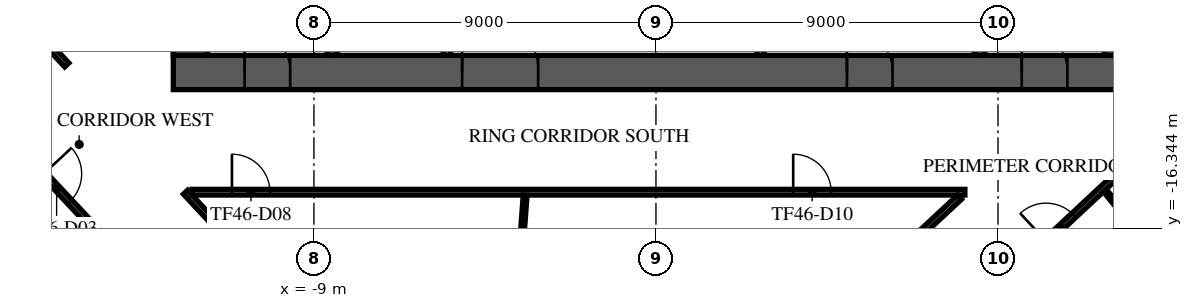
"""IFC4 building model, lengths in metres.
Left out: names, types, materials, properties, quantities, classifications, styles, units other than length and angle.
Written with IfcOpenShell. Run it as: python <this file> out.ifc"""

import sys

from ifc_helpers import new_model, si_unit, direction, frame, frame_2d, origin, place, context, subcontext, project, spatial, rectangle, extrude, element, fill, save


model = new_model("IFC4")
c1 = context("Model", 3, precision=1e-05, world=origin(), true_north=direction((0.0, 1.0)))
c2 = subcontext(c1, "Body", "Model", "MODEL_VIEW")
j1 = project(units=[si_unit("LENGTHUNIT", "METRE"), si_unit("PLANEANGLEUNIT", "RADIAN")], contexts=[c1])
p1 = place(None, origin())
s1 = spatial("IfcSite", under=j1, at=p1, CompositionType="ELEMENT")
p2 = place(p1, origin())
s2 = spatial("IfcBuilding", under=s1, at=p2, CompositionType="ELEMENT")
p3 = place(p2, frame((0.0, 0.0, 197.3)))
s3 = spatial("IfcBuildingStorey", under=s2, at=p3, CompositionType="ELEMENT", Elevation=197.3)
p4 = place(p3, frame((-12.7, -12.25, 0.0), z_axis=(0.0, 0.0, 1.0), x_axis=(1.0, 0.0, 0.0)))
e1 = element("IfcWall", 1, at=p4, inside=s3, PredefinedType="SHEAR", context=c2, shape_type="SweptSolid", body=[
    extrude(rectangle(XDim=25.4, YDim=0.9, at=frame_2d((12.7, 0.0))), origin(), (0.0, 0.0, 1.0), 3.62),
])
p5 = place(p4, frame((7.6, 0.0, 0.0)))
e2 = element("IfcOpeningElement", 2, at=p5, cuts=e1, PredefinedType="OPENING", context=c2, shape_type="SweptSolid", body=[
    extrude(rectangle(XDim=2.0, YDim=2.1, at=frame_2d((1.0, 1.05))), frame((0.0, 0.46, 0.0), z_axis=(0.0, -1.0, 0.0), x_axis=(1.0, 0.0, 0.0)), (0.0, 0.0, 1.0), 0.92),
])
p6 = place(p4, frame((17.725, 0.0, 0.0)))
e3 = element("IfcOpeningElement", 3, at=p6, cuts=e1, PredefinedType="OPENING", context=c2, shape_type="SweptSolid", body=[
    extrude(rectangle(XDim=1.2, YDim=2.1, at=frame_2d((0.6, 1.05))), frame((0.0, 0.46, 0.0), z_axis=(0.0, -1.0, 0.0), x_axis=(1.0, 0.0, 0.0)), (0.0, 0.0, 1.0), 0.92),
])
p7 = place(p4, frame((1.875, 0.0, 0.0)))
e4 = element("IfcOpeningElement", 4, at=p7, cuts=e1, PredefinedType="OPENING", context=c2, shape_type="SweptSolid", body=[
    extrude(rectangle(XDim=1.2, YDim=2.1, at=frame_2d((0.6, 1.05))), frame((0.0, 0.46, 0.0), z_axis=(0.0, -1.0, 0.0), x_axis=(1.0, 0.0, 0.0)), (0.0, 0.0, 1.0), 0.92),
])
p8 = place(p4, frame((22.325, 0.0, 0.0)))
e5 = element("IfcOpeningElement", 5, at=p8, cuts=e1, PredefinedType="OPENING", context=c2, shape_type="SweptSolid", body=[
    extrude(rectangle(XDim=1.2, YDim=2.1, at=frame_2d((0.6, 1.05))), frame((0.0, 0.46, 0.0), z_axis=(0.0, -1.0, 0.0), x_axis=(1.0, 0.0, 0.0)), (0.0, 0.0, 1.0), 0.92),
])
p9 = place(p3, frame((12.25, -11.8, 0.0), z_axis=(0.0, 0.0, 1.0), x_axis=(0.0, 1.0, 0.0)))
e6 = element("IfcWall", 6, at=p9, inside=s3, PredefinedType="SHEAR", context=c2, shape_type="SweptSolid", body=[
    extrude(rectangle(XDim=23.6, YDim=0.9, at=frame_2d((11.8, 0.0))), origin(), (0.0, 0.0, 1.0), 3.62),
])
p10 = place(p9, frame((10.6, 0.0, 0.0)))
e7 = element("IfcOpeningElement", 7, at=p10, cuts=e6, PredefinedType="OPENING", context=c2, shape_type="SweptSolid", body=[
    extrude(rectangle(XDim=2.4, YDim=2.4, at=frame_2d((1.2, 1.2))), frame((0.0, 0.46, 0.0), z_axis=(0.0, -1.0, 0.0), x_axis=(1.0, 0.0, 0.0)), (0.0, 0.0, 1.0), 0.92),
])
p11 = place(p3, frame((-12.25, -11.8, 0.0), z_axis=(0.0, 0.0, 1.0), x_axis=(0.0, 1.0, 0.0)))
e8 = element("IfcWall", 8, at=p11, inside=s3, PredefinedType="SHEAR", context=c2, shape_type="SweptSolid", body=[
    extrude(rectangle(XDim=23.6, YDim=0.9, at=frame_2d((11.8, 0.0))), origin(), (0.0, 0.0, 1.0), 3.62),
])
p12 = place(p11, frame((10.6, 0.0, 0.0)))
e9 = element("IfcOpeningElement", 9, at=p12, cuts=e8, PredefinedType="OPENING", context=c2, shape_type="SweptSolid", body=[
    extrude(rectangle(XDim=2.4, YDim=2.4, at=frame_2d((1.2, 1.2))), frame((0.0, 0.46, 0.0), z_axis=(0.0, -1.0, 0.0), x_axis=(1.0, 0.0, 0.0)), (0.0, 0.0, 1.0), 0.92),
])
p13 = place(p3, frame((-8.512, -4.55, 0.0), z_axis=(0.0, 0.0, 1.0), x_axis=(0.0, -1.0, 0.0)))
e10 = element("IfcWall", 10, at=p13, inside=s3, PredefinedType="SOLIDWALL", context=c2, shape_type="SweptSolid", body=[
    extrude(rectangle(XDim=7.25, YDim=0.275, at=frame_2d((3.625, 0.0))), origin(), (0.0, 0.0, 1.0), 3.62),
])
p14 = place(p13, frame((6.0, 0.0, 0.0)))
e11 = element("IfcOpeningElement", 11, at=p14, cuts=e10, PredefinedType="OPENING", context=c2, shape_type="SweptSolid", body=[
    extrude(rectangle(XDim=1.0, YDim=2.1, at=frame_2d((0.5, 1.05))), frame((0.0, 0.147, 0.0), z_axis=(0.0, -1.0, 0.0), x_axis=(1.0, 0.0, 0.0)), (0.0, 0.0, 1.0), 0.295),
])
p15 = place(p3, frame((8.512, -4.55, 0.0), z_axis=(0.0, 0.0, 1.0), x_axis=(0.0, -1.0, 0.0)))
e12 = element("IfcWall", 12, at=p15, inside=s3, PredefinedType="SOLIDWALL", context=c2, shape_type="SweptSolid", body=[
    extrude(rectangle(XDim=7.25, YDim=0.275, at=frame_2d((3.625, 0.0))), origin(), (0.0, 0.0, 1.0), 3.62),
])
p16 = place(p15, frame((6.0, 0.0, 0.0)))
e13 = element("IfcOpeningElement", 13, at=p16, cuts=e12, PredefinedType="OPENING", context=c2, shape_type="SweptSolid", body=[
    extrude(rectangle(XDim=1.0, YDim=2.1, at=frame_2d((0.5, 1.05))), frame((0.0, 0.147, 0.0), z_axis=(0.0, -1.0, 0.0), x_axis=(1.0, 0.0, 0.0)), (0.0, 0.0, 1.0), 0.295),
])
p17 = place(p3, frame((-5.5, -11.795, 0.0), z_axis=(0.0, 0.0, 1.0), x_axis=(0.0, 1.0, 0.0)))
e14 = element("IfcWall", 14, at=p17, inside=s3, PredefinedType="PARTITIONING", context=c2, shape_type="SweptSolid", body=[
    extrude(rectangle(XDim=2.99, YDim=0.2, at=frame_2d((1.495, 0.0))), origin(), (0.0, 0.0, 1.0), 3.62),
])
p18 = place(p17, frame((0.657, 0.0, 0.0)))
e15 = element("IfcOpeningElement", 15, at=p18, cuts=e14, PredefinedType="OPENING", context=c2, shape_type="SweptSolid", body=[
    extrude(rectangle(XDim=1.8, YDim=2.1, at=frame_2d((0.9, 1.05))), frame((0.0, 0.11, 0.0), z_axis=(0.0, -1.0, 0.0), x_axis=(1.0, 0.0, 0.0)), (0.0, 0.0, 1.0), 0.22),
])
p19 = place(p3, frame((2.75, -11.795, 0.0), z_axis=(0.0, 0.0, 1.0), x_axis=(0.0, 1.0, 0.0)))
e16 = element("IfcWall", 16, at=p19, inside=s3, PredefinedType="PARTITIONING", context=c2, shape_type="SweptSolid", body=[
    extrude(rectangle(XDim=2.99, YDim=0.2, at=frame_2d((1.495, 0.0))), origin(), (0.0, 0.0, 1.0), 3.62),
])
p20 = place(p3, frame((-35.02, -5.994, 0.0), z_axis=(0.0, 0.0, 1.0), x_axis=(0.682002361324, -0.731349970362, 0.0)))
e17 = element("IfcWall", 17, at=p20, inside=s3, PredefinedType="STANDARD", context=c2, shape_type="SweptSolid", body=[
    extrude(rectangle(XDim=39.0, YDim=0.6, at=frame_2d((19.5, 0.0))), origin(), (0.0, 0.0, 1.0), 3.62),
])
p21 = place(p20, frame((1.217, 0.0, 0.9)))
e18 = element("IfcOpeningElement", 18, at=p21, cuts=e17, PredefinedType="OPENING", context=c2, shape_type="SweptSolid", body=[
    extrude(rectangle(XDim=1.9, YDim=2.1, at=frame_2d((0.95, 1.05))), frame((0.0, 0.31, 0.0), z_axis=(0.0, -1.0, 0.0), x_axis=(1.0, 0.0, 0.0)), (0.0, 0.0, 1.0), 0.62),
])
p22 = place(p20, frame((5.55, 0.0, 0.9)))
e19 = element("IfcOpeningElement", 19, at=p22, cuts=e17, PredefinedType="OPENING", context=c2, shape_type="SweptSolid", body=[
    extrude(rectangle(XDim=1.9, YDim=2.1, at=frame_2d((0.95, 1.05))), frame((0.0, 0.31, 0.0), z_axis=(0.0, -1.0, 0.0), x_axis=(1.0, 0.0, 0.0)), (0.0, 0.0, 1.0), 0.62),
])
p23 = place(p20, frame((9.883, 0.0, 0.9)))
e20 = element("IfcOpeningElement", 20, at=p23, cuts=e17, PredefinedType="OPENING", context=c2, shape_type="SweptSolid", body=[
    extrude(rectangle(XDim=1.9, YDim=2.1, at=frame_2d((0.95, 1.05))), frame((0.0, 0.31, 0.0), z_axis=(0.0, -1.0, 0.0), x_axis=(1.0, 0.0, 0.0)), (0.0, 0.0, 1.0), 0.62),
])
p24 = place(p20, frame((14.217, 0.0, 0.9)))
e21 = element("IfcOpeningElement", 21, at=p24, cuts=e17, PredefinedType="OPENING", context=c2, shape_type="SweptSolid", body=[
    extrude(rectangle(XDim=1.9, YDim=2.1, at=frame_2d((0.95, 1.05))), frame((0.0, 0.31, 0.0), z_axis=(0.0, -1.0, 0.0), x_axis=(1.0, 0.0, 0.0)), (0.0, 0.0, 1.0), 0.62),
])
p25 = place(p20, frame((18.55, 0.0, 0.9)))
e22 = element("IfcOpeningElement", 22, at=p25, cuts=e17, PredefinedType="OPENING", context=c2, shape_type="SweptSolid", body=[
    extrude(rectangle(XDim=1.9, YDim=2.1, at=frame_2d((0.95, 1.05))), frame((0.0, 0.31, 0.0), z_axis=(0.0, -1.0, 0.0), x_axis=(1.0, 0.0, 0.0)), (0.0, 0.0, 1.0), 0.62),
])
p26 = place(p20, frame((22.883, 0.0, 0.9)))
e23 = element("IfcOpeningElement", 23, at=p26, cuts=e17, PredefinedType="OPENING", context=c2, shape_type="SweptSolid", body=[
    extrude(rectangle(XDim=1.9, YDim=2.1, at=frame_2d((0.95, 1.05))), frame((0.0, 0.31, 0.0), z_axis=(0.0, -1.0, 0.0), x_axis=(1.0, 0.0, 0.0)), (0.0, 0.0, 1.0), 0.62),
])
p27 = place(p20, frame((27.217, 0.0, 0.9)))
e24 = element("IfcOpeningElement", 24, at=p27, cuts=e17, PredefinedType="OPENING", context=c2, shape_type="SweptSolid", body=[
    extrude(rectangle(XDim=1.9, YDim=2.1, at=frame_2d((0.95, 1.05))), frame((0.0, 0.31, 0.0), z_axis=(0.0, -1.0, 0.0), x_axis=(1.0, 0.0, 0.0)), (0.0, 0.0, 1.0), 0.62),
])
p28 = place(p20, frame((31.55, 0.0, 0.9)))
e25 = element("IfcOpeningElement", 25, at=p28, cuts=e17, PredefinedType="OPENING", context=c2, shape_type="SweptSolid", body=[
    extrude(rectangle(XDim=1.9, YDim=2.1, at=frame_2d((0.95, 1.05))), frame((0.0, 0.31, 0.0), z_axis=(0.0, -1.0, 0.0), x_axis=(1.0, 0.0, 0.0)), (0.0, 0.0, 1.0), 0.62),
])
p29 = place(p20, frame((35.883, 0.0, 0.9)))
e26 = element("IfcOpeningElement", 26, at=p29, cuts=e17, PredefinedType="OPENING", context=c2, shape_type="SweptSolid", body=[
    extrude(rectangle(XDim=1.9, YDim=2.1, at=frame_2d((0.95, 1.05))), frame((0.0, 0.31, 0.0), z_axis=(0.0, -1.0, 0.0), x_axis=(1.0, 0.0, 0.0)), (0.0, 0.0, 1.0), 0.62),
])
p30 = place(p3, frame((-1.073, -34.773, 0.0), z_axis=(0.0, 0.0, 1.0), x_axis=(0.731351780381, 0.682000420333, 0.0)))
e27 = element("IfcWall", 27, at=p30, inside=s3, PredefinedType="STANDARD", context=c2, shape_type="SweptSolid", body=[
    extrude(rectangle(XDim=49.0, YDim=0.6, at=frame_2d((24.5, 0.0))), origin(), (0.0, 0.0, 1.0), 3.62),
])
p31 = place(p30, frame((1.227, 0.0, 0.9)))
e28 = element("IfcOpeningElement", 28, at=p31, cuts=e27, PredefinedType="OPENING", context=c2, shape_type="SweptSolid", body=[
    extrude(rectangle(XDim=2.0, YDim=2.1, at=frame_2d((1.0, 1.05))), frame((0.0, 0.31, 0.0), z_axis=(0.0, -1.0, 0.0), x_axis=(1.0, 0.0, 0.0)), (0.0, 0.0, 1.0), 0.62),
])
p32 = place(p30, frame((5.682, 0.0, 0.9)))
e29 = element("IfcOpeningElement", 29, at=p32, cuts=e27, PredefinedType="OPENING", context=c2, shape_type="SweptSolid", body=[
    extrude(rectangle(XDim=2.0, YDim=2.1, at=frame_2d((1.0, 1.05))), frame((0.0, 0.31, 0.0), z_axis=(0.0, -1.0, 0.0), x_axis=(1.0, 0.0, 0.0)), (0.0, 0.0, 1.0), 0.62),
])
p33 = place(p30, frame((14.591, 0.0, 0.9)))
e30 = element("IfcOpeningElement", 30, at=p33, cuts=e27, PredefinedType="OPENING", context=c2, shape_type="SweptSolid", body=[
    extrude(rectangle(XDim=2.0, YDim=2.1, at=frame_2d((1.0, 1.05))), frame((0.0, 0.31, 0.0), z_axis=(0.0, -1.0, 0.0), x_axis=(1.0, 0.0, 0.0)), (0.0, 0.0, 1.0), 0.62),
])
p34 = place(p30, frame((19.045, 0.0, 0.9)))
e31 = element("IfcOpeningElement", 31, at=p34, cuts=e27, PredefinedType="OPENING", context=c2, shape_type="SweptSolid", body=[
    extrude(rectangle(XDim=2.0, YDim=2.1, at=frame_2d((1.0, 1.05))), frame((0.0, 0.31, 0.0), z_axis=(0.0, -1.0, 0.0), x_axis=(1.0, 0.0, 0.0)), (0.0, 0.0, 1.0), 0.62),
])
p35 = place(p30, frame((23.5, 0.0, 0.9)))
e32 = element("IfcOpeningElement", 32, at=p35, cuts=e27, PredefinedType="OPENING", context=c2, shape_type="SweptSolid", body=[
    extrude(rectangle(XDim=2.0, YDim=2.1, at=frame_2d((1.0, 1.05))), frame((0.0, 0.31, 0.0), z_axis=(0.0, -1.0, 0.0), x_axis=(1.0, 0.0, 0.0)), (0.0, 0.0, 1.0), 0.62),
])
p36 = place(p30, frame((27.955, 0.0, 0.9)))
e33 = element("IfcOpeningElement", 33, at=p36, cuts=e27, PredefinedType="OPENING", context=c2, shape_type="SweptSolid", body=[
    extrude(rectangle(XDim=2.0, YDim=2.1, at=frame_2d((1.0, 1.05))), frame((0.0, 0.31, 0.0), z_axis=(0.0, -1.0, 0.0), x_axis=(1.0, 0.0, 0.0)), (0.0, 0.0, 1.0), 0.62),
])
p37 = place(p30, frame((32.409, 0.0, 0.9)))
e34 = element("IfcOpeningElement", 34, at=p37, cuts=e27, PredefinedType="OPENING", context=c2, shape_type="SweptSolid", body=[
    extrude(rectangle(XDim=2.0, YDim=2.1, at=frame_2d((1.0, 1.05))), frame((0.0, 0.31, 0.0), z_axis=(0.0, -1.0, 0.0), x_axis=(1.0, 0.0, 0.0)), (0.0, 0.0, 1.0), 0.62),
])
p38 = place(p30, frame((36.864, 0.0, 0.9)))
e35 = element("IfcOpeningElement", 35, at=p38, cuts=e27, PredefinedType="OPENING", context=c2, shape_type="SweptSolid", body=[
    extrude(rectangle(XDim=2.0, YDim=2.1, at=frame_2d((1.0, 1.05))), frame((0.0, 0.31, 0.0), z_axis=(0.0, -1.0, 0.0), x_axis=(1.0, 0.0, 0.0)), (0.0, 0.0, 1.0), 0.62),
])
p39 = place(p30, frame((41.318, 0.0, 0.9)))
e36 = element("IfcOpeningElement", 36, at=p39, cuts=e27, PredefinedType="OPENING", context=c2, shape_type="SweptSolid", body=[
    extrude(rectangle(XDim=2.0, YDim=2.1, at=frame_2d((1.0, 1.05))), frame((0.0, 0.31, 0.0), z_axis=(0.0, -1.0, 0.0), x_axis=(1.0, 0.0, 0.0)), (0.0, 0.0, 1.0), 0.62),
])
p40 = place(p30, frame((45.773, 0.0, 0.9)))
e37 = element("IfcOpeningElement", 37, at=p40, cuts=e27, PredefinedType="OPENING", context=c2, shape_type="SweptSolid", body=[
    extrude(rectangle(XDim=2.0, YDim=2.1, at=frame_2d((1.0, 1.05))), frame((0.0, 0.31, 0.0), z_axis=(0.0, -1.0, 0.0), x_axis=(1.0, 0.0, 0.0)), (0.0, 0.0, 1.0), 0.62),
])
p41 = place(p3, frame((-23.582, -6.907, 0.0), z_axis=(0.0, 0.0, 1.0), x_axis=(0.68201130552, -0.73134162957, 0.0)))
e38 = element("IfcWall", 38, at=p41, inside=s3, PredefinedType="PARTITIONING", context=c2, shape_type="SweptSolid", body=[
    extrude(rectangle(XDim=22.137, YDim=0.15, at=frame_2d((11.069, 0.0))), origin(), (0.0, 0.0, 1.0), 3.17),
])
p42 = place(p41, frame((10.953, 0.0, 0.0)))
e39 = element("IfcOpeningElement", 39, at=p42, cuts=e38, PredefinedType="OPENING", context=c2, shape_type="SweptSolid", body=[
    extrude(rectangle(XDim=1.0, YDim=2.1, at=frame_2d((0.5, 1.05))), frame((0.0, 0.085, 0.0), z_axis=(0.0, -1.0, 0.0), x_axis=(1.0, 0.0, 0.0)), (0.0, 0.0, 1.0), 0.17),
])
p43 = place(p3, frame((-21.827, -5.27, 0.0), z_axis=(0.0, 0.0, 1.0), x_axis=(0.682018934887, -0.731334514744, 0.0)))
e40 = element("IfcWall", 40, at=p43, inside=s3, PredefinedType="PARTITIONING", context=c2, shape_type="SweptSolid", body=[
    extrude(rectangle(XDim=9.272, YDim=0.15, at=frame_2d((4.636, 0.0))), origin(), (0.0, 0.0, 1.0), 3.17),
])
p44 = place(p3, frame((-12.38, -15.4, 0.0), z_axis=(0.0, 0.0, 1.0), x_axis=(0.681925559665, -0.731421582314, 0.0)))
e41 = element("IfcWall", 41, at=p44, inside=s3, PredefinedType="PARTITIONING", context=c2, shape_type="SweptSolid", body=[
    extrude(rectangle(XDim=8.287, YDim=0.15, at=frame_2d((4.143, 0.0))), origin(), (0.0, 0.0, 1.0), 3.17),
])
p45 = place(p44, frame((5.55, 0.0, 0.0)))
e42 = element("IfcOpeningElement", 42, at=p45, cuts=e41, PredefinedType="OPENING", context=c2, shape_type="SweptSolid", body=[
    extrude(rectangle(XDim=1.8, YDim=2.1, at=frame_2d((0.9, 1.05))), frame((0.0, 0.085, 0.0), z_axis=(0.0, -1.0, 0.0), x_axis=(1.0, 0.0, 0.0)), (0.0, 0.0, 1.0), 0.17),
])
p46 = place(p3, frame((-12.208, -15.4, 0.0), z_axis=(0.0, 0.0, 1.0), x_axis=(1.0, 0.0, 0.0)))
e43 = element("IfcWall", 43, at=p46, inside=s3, PredefinedType="PARTITIONING", context=c2, shape_type="SweptSolid", body=[
    extrude(rectangle(XDim=20.336, YDim=0.15, at=frame_2d((10.168, 0.0))), origin(), (0.0, 0.0, 1.0), 3.17),
])
p47 = place(p46, frame((1.05, 0.0, 0.0)))
e44 = element("IfcOpeningElement", 44, at=p47, cuts=e43, PredefinedType="OPENING", context=c2, shape_type="SweptSolid", body=[
    extrude(rectangle(XDim=1.0, YDim=2.1, at=frame_2d((0.5, 1.05))), frame((0.0, 0.085, 0.0), z_axis=(0.0, -1.0, 0.0), x_axis=(1.0, 0.0, 0.0)), (0.0, 0.0, 1.0), 0.17),
])
p48 = place(p46, frame((15.818, 0.0, 0.0)))
e45 = element("IfcOpeningElement", 45, at=p48, cuts=e43, PredefinedType="OPENING", context=c2, shape_type="SweptSolid", body=[
    extrude(rectangle(XDim=1.0, YDim=2.1, at=frame_2d((0.5, 1.05))), frame((0.0, 0.085, 0.0), z_axis=(0.0, -1.0, 0.0), x_axis=(1.0, 0.0, 0.0)), (0.0, 0.0, 1.0), 0.17),
])
p49 = place(p3, frame((-0.061, -23.038, 0.0), z_axis=(0.0, 0.0, 1.0), x_axis=(0.731316284431, 0.682038482878, 0.0)))
e46 = element("IfcWall", 46, at=p49, inside=s3, PredefinedType="PARTITIONING", context=c2, shape_type="SweptSolid", body=[
    extrude(rectangle(XDim=11.009, YDim=0.15, at=frame_2d((5.504, 0.0))), origin(), (0.0, 0.0, 1.0), 3.17),
])
p50 = place(p3, frame((1.576, -24.793, 0.0), z_axis=(0.0, 0.0, 1.0), x_axis=(0.731351215564, 0.68200102602, 0.0)))
e47 = element("IfcWall", 47, at=p50, inside=s3, PredefinedType="PARTITIONING", context=c2, shape_type="SweptSolid", body=[
    extrude(rectangle(XDim=31.513, YDim=0.15, at=frame_2d((15.757, 0.0))), origin(), (0.0, 0.0, 1.0), 3.17),
])
p51 = place(p50, frame((2.3, 0.0, 0.0)))
e48 = element("IfcOpeningElement", 48, at=p51, cuts=e47, PredefinedType="OPENING", context=c2, shape_type="SweptSolid", body=[
    extrude(rectangle(XDim=1.8, YDim=2.1, at=frame_2d((0.9, 1.05))), frame((0.0, 0.085, 0.0), z_axis=(0.0, -1.0, 0.0), x_axis=(1.0, 0.0, 0.0)), (0.0, 0.0, 1.0), 0.17),
])
p52 = place(p50, frame((11.883, 0.0, 0.0)))
e49 = element("IfcOpeningElement", 49, at=p52, cuts=e47, PredefinedType="OPENING", context=c2, shape_type="SweptSolid", body=[
    extrude(rectangle(XDim=1.0, YDim=2.1, at=frame_2d((0.5, 1.05))), frame((0.0, 0.085, 0.0), z_axis=(0.0, -1.0, 0.0), x_axis=(1.0, 0.0, 0.0)), (0.0, 0.0, 1.0), 0.17),
])
p53 = place(p50, frame((15.726, 0.0, 0.0)))
e50 = element("IfcOpeningElement", 50, at=p53, cuts=e47, PredefinedType="OPENING", context=c2, shape_type="SweptSolid", body=[
    extrude(rectangle(XDim=1.0, YDim=2.1, at=frame_2d((0.5, 1.05))), frame((0.0, 0.085, 0.0), z_axis=(0.0, -1.0, 0.0), x_axis=(1.0, 0.0, 0.0)), (0.0, 0.0, 1.0), 0.17),
])
p54 = place(p3, frame((-4.597, -31.012, 0.0), z_axis=(0.0, 0.0, 1.0), x_axis=(0.074186343443, 0.997244396548, 0.0)))
e51 = element("IfcWall", 51, at=p54, inside=s3, PredefinedType="PARTITIONING", context=c2, shape_type="SweptSolid", body=[
    extrude(rectangle(XDim=15.576, YDim=0.1, at=frame_2d((7.788, 0.0))), origin(), (0.0, 0.0, 1.0), 2.97),
])
p55 = place(p3, frame((11.812, -15.355, 0.0), z_axis=(0.0, 0.0, 1.0), x_axis=(0.629927020313, -0.776654330497, 0.0)))
e52 = element("IfcWall", 52, at=p55, inside=s3, PredefinedType="PARTITIONING", context=c2, shape_type="SweptSolid", body=[
    extrude(rectangle(XDim=5.125, YDim=0.1, at=frame_2d((2.562, 0.0))), origin(), (0.0, 0.0, 1.0), 2.97),
])
p56 = place(p5, origin())
e53 = element("IfcDoor", 53, at=p56, inside=s3, OperationType="SINGLE_SWING_LEFT", PredefinedType="DOOR", context=c2, shape_type="SweptSolid", body=[
    extrude(rectangle(XDim=2.0, YDim=2.1, at=frame_2d((1.0, 1.05))), frame((0.0, 0.025, 0.0), z_axis=(0.0, -1.0, 0.0), x_axis=(1.0, 0.0, 0.0)), (0.0, 0.0, 1.0), 0.05),
])
fill(e2, e53)
p57 = place(p6, origin())
e54 = element("IfcDoor", 54, at=p57, inside=s3, OperationType="SINGLE_SWING_LEFT", PredefinedType="DOOR", context=c2, shape_type="SweptSolid", body=[
    extrude(rectangle(XDim=1.2, YDim=2.1, at=frame_2d((0.6, 1.05))), frame((0.0, 0.025, 0.0), z_axis=(0.0, -1.0, 0.0), x_axis=(1.0, 0.0, 0.0)), (0.0, 0.0, 1.0), 0.05),
])
fill(e3, e54)
p58 = place(p7, origin())
e55 = element("IfcDoor", 55, at=p58, inside=s3, OperationType="SINGLE_SWING_LEFT", PredefinedType="DOOR", context=c2, shape_type="SweptSolid", body=[
    extrude(rectangle(XDim=1.2, YDim=2.1, at=frame_2d((0.6, 1.05))), frame((0.0, 0.025, 0.0), z_axis=(0.0, -1.0, 0.0), x_axis=(1.0, 0.0, 0.0)), (0.0, 0.0, 1.0), 0.05),
])
fill(e4, e55)
p59 = place(p8, origin())
e56 = element("IfcDoor", 56, at=p59, inside=s3, OperationType="SINGLE_SWING_LEFT", PredefinedType="DOOR", context=c2, shape_type="SweptSolid", body=[
    extrude(rectangle(XDim=1.2, YDim=2.1, at=frame_2d((0.6, 1.05))), frame((0.0, 0.025, 0.0), z_axis=(0.0, -1.0, 0.0), x_axis=(1.0, 0.0, 0.0)), (0.0, 0.0, 1.0), 0.05),
])
fill(e5, e56)
p60 = place(p42, frame((1.0, 0.0, 0.0), z_axis=(0.0, 0.0, 1.0), x_axis=(-1.0, 0.0, 0.0)))
e57 = element("IfcDoor", 57, at=p60, inside=s3, OperationType="SINGLE_SWING_RIGHT", PredefinedType="DOOR", context=c2, shape_type="SweptSolid", body=[
    extrude(rectangle(XDim=1.0, YDim=2.1, at=frame_2d((0.5, 1.05))), frame((0.0, 0.025, 0.0), z_axis=(0.0, -1.0, 0.0), x_axis=(1.0, 0.0, 0.0)), (0.0, 0.0, 1.0), 0.05),
])
fill(e39, e57)
p61 = place(p47, frame((1.0, 0.0, 0.0), z_axis=(0.0, 0.0, 1.0), x_axis=(-1.0, 0.0, 0.0)))
e58 = element("IfcDoor", 58, at=p61, inside=s3, OperationType="SINGLE_SWING_RIGHT", PredefinedType="DOOR", context=c2, shape_type="SweptSolid", body=[
    extrude(rectangle(XDim=1.0, YDim=2.1, at=frame_2d((0.5, 1.05))), frame((0.0, 0.025, 0.0), z_axis=(0.0, -1.0, 0.0), x_axis=(1.0, 0.0, 0.0)), (0.0, 0.0, 1.0), 0.05),
])
fill(e44, e58)
p62 = place(p48, frame((1.0, 0.0, 0.0), z_axis=(0.0, 0.0, 1.0), x_axis=(-1.0, 0.0, 0.0)))
e59 = element("IfcDoor", 59, at=p62, inside=s3, OperationType="SINGLE_SWING_LEFT", PredefinedType="DOOR", context=c2, shape_type="SweptSolid", body=[
    extrude(rectangle(XDim=1.0, YDim=2.1, at=frame_2d((0.5, 1.05))), frame((0.0, 0.025, 0.0), z_axis=(0.0, -1.0, 0.0), x_axis=(1.0, 0.0, 0.0)), (0.0, 0.0, 1.0), 0.05),
])
fill(e45, e59)
p63 = place(p52, frame((1.0, 0.0, 0.0), z_axis=(0.0, 0.0, 1.0), x_axis=(-1.0, 0.0, 0.0)))
e60 = element("IfcDoor", 60, at=p63, inside=s3, OperationType="SINGLE_SWING_LEFT", PredefinedType="DOOR", context=c2, shape_type="SweptSolid", body=[
    extrude(rectangle(XDim=1.0, YDim=2.1, at=frame_2d((0.5, 1.05))), frame((0.0, 0.025, 0.0), z_axis=(0.0, -1.0, 0.0), x_axis=(1.0, 0.0, 0.0)), (0.0, 0.0, 1.0), 0.05),
])
fill(e49, e60)
save(model, sys.argv[1])
